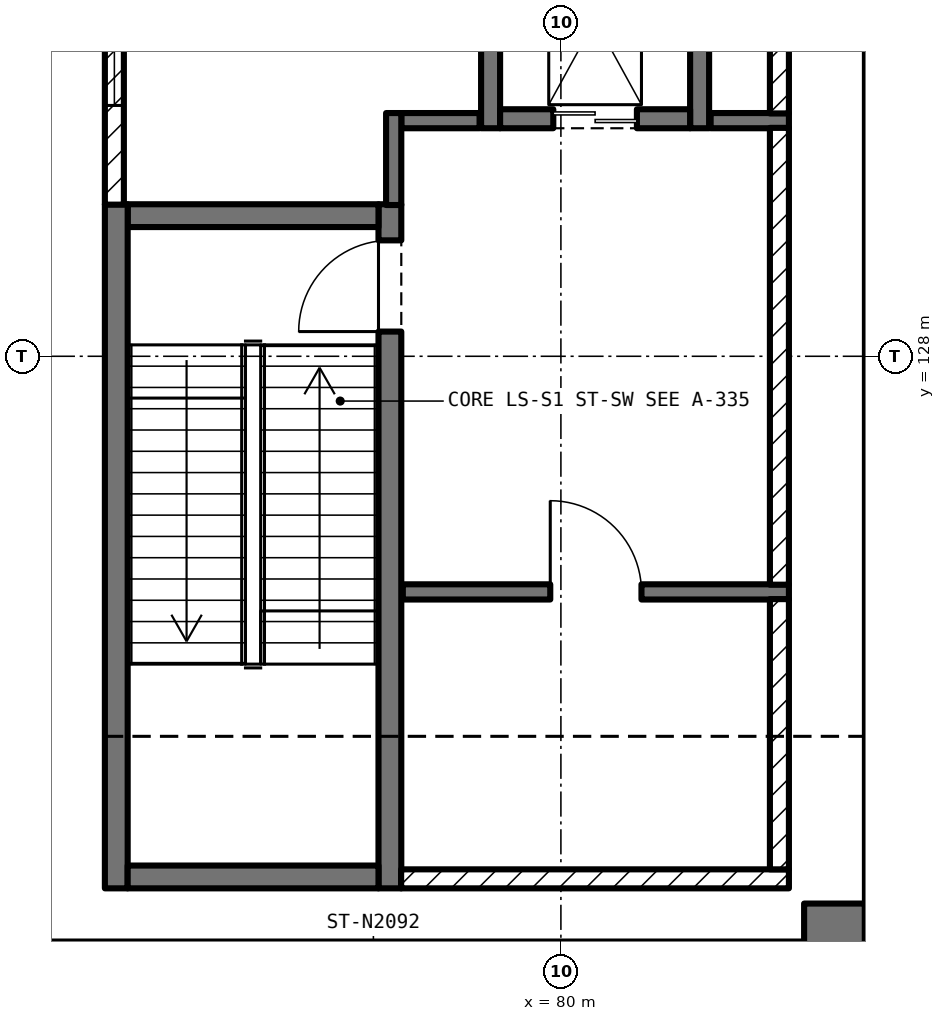
"""IFC4 building model, lengths in metres.
Left out: names, types, materials, properties, quantities, classifications, styles, units other than length and angle.
Written with IfcOpenShell. Run it as: python <this file> out.ifc"""

import sys

from ifc_helpers import new_model, si_unit, direction, frame, frame_2d, origin, place, context, subcontext, project, spatial, rectangle, extrude, element, fill, save


model = new_model("IFC4")
c1 = context("Model", 3, precision=1e-05, world=origin(), true_north=direction((0.0, 1.0)))
c2 = subcontext(c1, "Body", "Model", "MODEL_VIEW")
j1 = project(units=[si_unit("LENGTHUNIT", "METRE"), si_unit("PLANEANGLEUNIT", "RADIAN")], contexts=[c1])
p1 = place(None, origin())
s1 = spatial("IfcSite", under=j1, at=p1, CompositionType="ELEMENT")
p2 = place(p1, origin())
s2 = spatial("IfcBuilding", under=s1, at=p2, CompositionType="ELEMENT")
p3 = place(p2, frame((0.0, 0.0, 17.0)))
s3 = spatial("IfcBuildingStorey", under=s2, at=p3, CompositionType="ELEMENT", Elevation=17.0)
p4 = place(p3, frame((83.6, 95.2, 0.0), z_axis=(0.0, 0.0, 1.0), x_axis=(0.0, 1.0, 0.0)))
e1 = element("IfcWall", 1, at=p4, inside=s3, PredefinedType="SHEAR", context=c2, shape_type="SweptSolid", body=[
    extrude(rectangle(XDim=25.6, YDim=0.8, at=frame_2d((12.8, 0.0))), origin(), (0.0, 0.0, 1.0), 5.5),
])
p5 = place(p3, frame((77.75, 121.0, 0.0), z_axis=(0.0, 0.0, 1.0), x_axis=(0.0, 1.0, 0.0)))
e2 = element("IfcWall", 2, at=p5, inside=s3, PredefinedType="SOLIDWALL", context=c2, shape_type="SweptSolid", body=[
    extrude(rectangle(XDim=9.0, YDim=0.3, at=frame_2d((4.5, 0.0))), origin(), (0.0, 0.0, 1.0), 5.5),
])
p6 = place(p5, frame((7.325, 0.0, 0.0)))
e3 = element("IfcOpeningElement", 3, at=p6, cuts=e2, PredefinedType="OPENING", context=c2, shape_type="SweptSolid", body=[
    extrude(rectangle(XDim=1.2, YDim=2.1, at=frame_2d((0.6, 1.05))), frame((0.0, 0.162, 0.0), z_axis=(0.0, -1.0, 0.0), x_axis=(1.0, 0.0, 0.0)), (0.0, 0.0, 1.0), 0.324),
])
p7 = place(p3, frame((77.6, 129.85, 0.0), z_axis=(0.0, 0.0, 1.0), x_axis=(-1.0, 0.0, 0.0)))
e4 = element("IfcWall", 4, at=p7, inside=s3, PredefinedType="SOLIDWALL", context=c2, shape_type="SweptSolid", body=[
    extrude(rectangle(XDim=3.3, YDim=0.3, at=frame_2d((1.65, 0.0))), origin(), (0.0, 0.0, 1.0), 5.5),
])
p8 = place(p3, frame((74.15, 130.0, 0.0), z_axis=(0.0, 0.0, 1.0), x_axis=(0.0, -1.0, 0.0)))
e5 = element("IfcWall", 5, at=p8, inside=s3, PredefinedType="SOLIDWALL", context=c2, shape_type="SweptSolid", body=[
    extrude(rectangle(XDim=9.0, YDim=0.3, at=frame_2d((4.5, 0.0))), origin(), (0.0, 0.0, 1.0), 5.5),
])
p9 = place(p3, frame((74.3, 121.15, 0.0), z_axis=(0.0, 0.0, 1.0), x_axis=(1.0, 0.0, 0.0)))
e6 = element("IfcWall", 6, at=p9, inside=s3, PredefinedType="SOLIDWALL", context=c2, shape_type="SweptSolid", body=[
    extrude(rectangle(XDim=3.3, YDim=0.3, at=frame_2d((1.65, 0.0))), origin(), (0.0, 0.0, 1.0), 5.5),
])
for number, where, z_axis, x_axis in (
    (7, (81.825, 131.0, 0.0), (0.0, 0.0, 1.0), (0.0, 1.0, 0.0)),
    (8, (79.075, 135.0, 0.0), (0.0, 0.0, 1.0), (0.0, -1.0, 0.0)),
):
    element("IfcWall", number, at=place(p3, frame(where, z_axis=z_axis, x_axis=x_axis)), inside=s3, PredefinedType="SOLIDWALL", context=c2, shape_type="SweptSolid", body=[
        extrude(rectangle(XDim=4.0, YDim=0.25, at=frame_2d((2.0, 0.0))), origin(), (0.0, 0.0, 1.0), 5.5),
    ])
p10 = place(p3, frame((79.2, 131.125, 0.0), z_axis=(0.0, 0.0, 1.0), x_axis=(1.0, 0.0, 0.0)))
e9 = element("IfcWall", 9, at=p10, inside=s3, PredefinedType="SOLIDWALL", context=c2, shape_type="SweptSolid", body=[
    extrude(rectangle(XDim=2.5, YDim=0.25, at=frame_2d((1.25, 0.0))), origin(), (0.0, 0.0, 1.0), 5.5),
])
p11 = place(p10, frame((0.7, 0.0, 0.0)))
e10 = element("IfcOpeningElement", 10, at=p11, cuts=e9, PredefinedType="OPENING", context=c2, shape_type="SweptSolid", body=[
    extrude(rectangle(XDim=1.1, YDim=2.1, at=frame_2d((0.55, 1.05))), frame((0.0, 0.137, 0.0), z_axis=(0.0, -1.0, 0.0), x_axis=(1.0, 0.0, 0.0)), (0.0, 0.0, 1.0), 0.274),
])
for number, where, z_axis, x_axis in (
    (11, (83.0, 131.1, 0.0), (0.0, 0.0, 1.0), (-1.0, 0.0, 0.0)),
    (12, (78.93, 131.1, 0.0), (0.0, 0.0, 1.0), (-1.0, 0.0, 0.0)),
):
    element("IfcWall", number, at=place(p3, frame(where, z_axis=z_axis, x_axis=x_axis)), inside=s3, PredefinedType="PARTITIONING", context=c2, shape_type="SweptSolid", body=[
        extrude(rectangle(XDim=1.03, YDim=0.2, at=frame_2d((0.515, 0.0))), origin(), (0.0, 0.0, 1.0), 5.28),
    ])
p12 = place(p3, frame((77.8, 131.2, 0.0), z_axis=(0.0, 0.0, 1.0), x_axis=(0.0, -1.0, 0.0)))
e13 = element("IfcWall", 13, at=p12, inside=s3, PredefinedType="PARTITIONING", context=c2, shape_type="SweptSolid", body=[
    extrude(rectangle(XDim=1.21, YDim=0.2, at=frame_2d((0.605, 0.0))), origin(), (0.0, 0.0, 1.0), 5.28),
])
p13 = place(p3, frame((77.92, 124.9, 0.0), z_axis=(0.0, 0.0, 1.0), x_axis=(1.0, 0.0, 0.0)))
e14 = element("IfcWall", 14, at=p13, inside=s3, PredefinedType="PARTITIONING", context=c2, shape_type="SweptSolid", body=[
    extrude(rectangle(XDim=5.08, YDim=0.2, at=frame_2d((2.54, 0.0))), origin(), (0.0, 0.0, 1.0), 5.28),
])
p14 = place(p13, frame((1.94, 0.0, 0.0)))
e15 = element("IfcOpeningElement", 15, at=p14, cuts=e14, PredefinedType="OPENING", context=c2, shape_type="SweptSolid", body=[
    extrude(rectangle(XDim=1.2, YDim=2.1, at=frame_2d((0.6, 1.05))), frame((0.0, 0.112, 0.0), z_axis=(0.0, -1.0, 0.0), x_axis=(1.0, 0.0, 0.0)), (0.0, 0.0, 1.0), 0.224),
])
p15 = place(p3, frame((74.125, 134.75, 0.0), z_axis=(0.0, 0.0, 1.0), x_axis=(0.0, -1.0, 0.0)))
e16 = element("IfcWall", 16, at=p15, inside=s3, PredefinedType="SOLIDWALL", context=c2, shape_type="SweptSolid", body=[
    extrude(rectangle(XDim=4.755, YDim=0.25, at=frame_2d((2.377, 0.0))), origin(), (0.0, 0.0, 1.0), 5.28),
])
p16 = place(p15, frame((1.05, 0.0, 2.6)))
e17 = element("IfcOpeningElement", 17, at=p16, cuts=e16, PredefinedType="OPENING", context=c2, shape_type="SweptSolid", body=[
    extrude(rectangle(XDim=2.4, YDim=1.2, at=frame_2d((1.2, 0.6))), frame((0.0, 0.137, 0.0), z_axis=(0.0, -1.0, 0.0), x_axis=(1.0, 0.0, 0.0)), (0.0, 0.0, 1.0), 0.274),
])
p17 = place(p3, frame((77.898, 121.125, 0.0), z_axis=(0.0, 0.0, 1.0), x_axis=(1.0, 0.0, 0.0)))
e18 = element("IfcWall", 18, at=p17, inside=s3, PredefinedType="SOLIDWALL", context=c2, shape_type="SweptSolid", body=[
    extrude(rectangle(XDim=5.102, YDim=0.25, at=frame_2d((2.551, 0.0))), origin(), (0.0, 0.0, 1.0), 5.28),
])
p18 = place(p3, frame((82.875, 121.25, 0.0), z_axis=(0.0, 0.0, 1.0), x_axis=(0.0, 1.0, 0.0)))
e19 = element("IfcWall", 19, at=p18, inside=s3, PredefinedType="SOLIDWALL", context=c2, shape_type="SweptSolid", body=[
    extrude(rectangle(XDim=3.555, YDim=0.25, at=frame_2d((1.777, 0.0))), origin(), (0.0, 0.0, 1.0), 5.28),
])
p19 = place(p3, frame((82.875, 124.995, 0.0), z_axis=(0.0, 0.0, 1.0), x_axis=(0.0, 1.0, 0.0)))
e20 = element("IfcWall", 20, at=p19, inside=s3, PredefinedType="SOLIDWALL", context=c2, shape_type="SweptSolid", body=[
    extrude(rectangle(XDim=6.01, YDim=0.25, at=frame_2d((3.005, 0.0))), origin(), (0.0, 0.0, 1.0), 5.28),
])
p20 = place(p3, frame((82.875, 131.195, 0.0), z_axis=(0.0, 0.0, 1.0), x_axis=(0.0, 1.0, 0.0)))
e21 = element("IfcWall", 21, at=p20, inside=s3, PredefinedType="SOLIDWALL", context=c2, shape_type="SweptSolid", body=[
    extrude(rectangle(XDim=3.805, YDim=0.25, at=frame_2d((1.902, 0.0))), origin(), (0.0, 0.0, 1.0), 5.28),
])
p21 = place(p6, origin())
e22 = element("IfcDoor", 22, at=p21, inside=s3, OperationType="SINGLE_SWING_LEFT", PredefinedType="DOOR", context=c2, shape_type="SweptSolid", body=[
    extrude(rectangle(XDim=1.2, YDim=2.1, at=frame_2d((0.6, 1.05))), frame((0.0, 0.025, 0.0), z_axis=(0.0, -1.0, 0.0), x_axis=(1.0, 0.0, 0.0)), (0.0, 0.0, 1.0), 0.05),
])
fill(e3, e22)
p22 = place(p11, origin())
e23 = element("IfcDoor", 23, at=p22, inside=s3, OperationType="DOUBLE_DOOR_SLIDING", PredefinedType="DOOR", context=c2, shape_type="SweptSolid", body=[
    extrude(rectangle(XDim=1.1, YDim=2.1, at=frame_2d((0.55, 1.05))), frame((0.0, 0.025, 0.0), z_axis=(0.0, -1.0, 0.0), x_axis=(1.0, 0.0, 0.0)), (0.0, 0.0, 1.0), 0.05),
])
fill(e10, e23)
p23 = place(p14, origin())
e24 = element("IfcDoor", 24, at=p23, inside=s3, OperationType="SINGLE_SWING_LEFT", PredefinedType="DOOR", context=c2, shape_type="SweptSolid", body=[
    extrude(rectangle(XDim=1.2, YDim=2.1, at=frame_2d((0.6, 1.05))), frame((0.0, 0.025, 0.0), z_axis=(0.0, -1.0, 0.0), x_axis=(1.0, 0.0, 0.0)), (0.0, 0.0, 1.0), 0.05),
])
fill(e15, e24)
p24 = place(p16, origin())
e25 = element("IfcWindow", 25, at=p24, inside=s3, PartitioningType="SINGLE_PANEL", PredefinedType="WINDOW", context=c2, shape_type="SweptSolid", body=[
    extrude(rectangle(XDim=2.4, YDim=1.2, at=frame_2d((1.2, 0.6))), frame((0.0, 0.03, 0.0), z_axis=(0.0, -1.0, 0.0), x_axis=(1.0, 0.0, 0.0)), (0.0, 0.0, 1.0), 0.06),
])
fill(e17, e25)
save(model, sys.argv[1])
